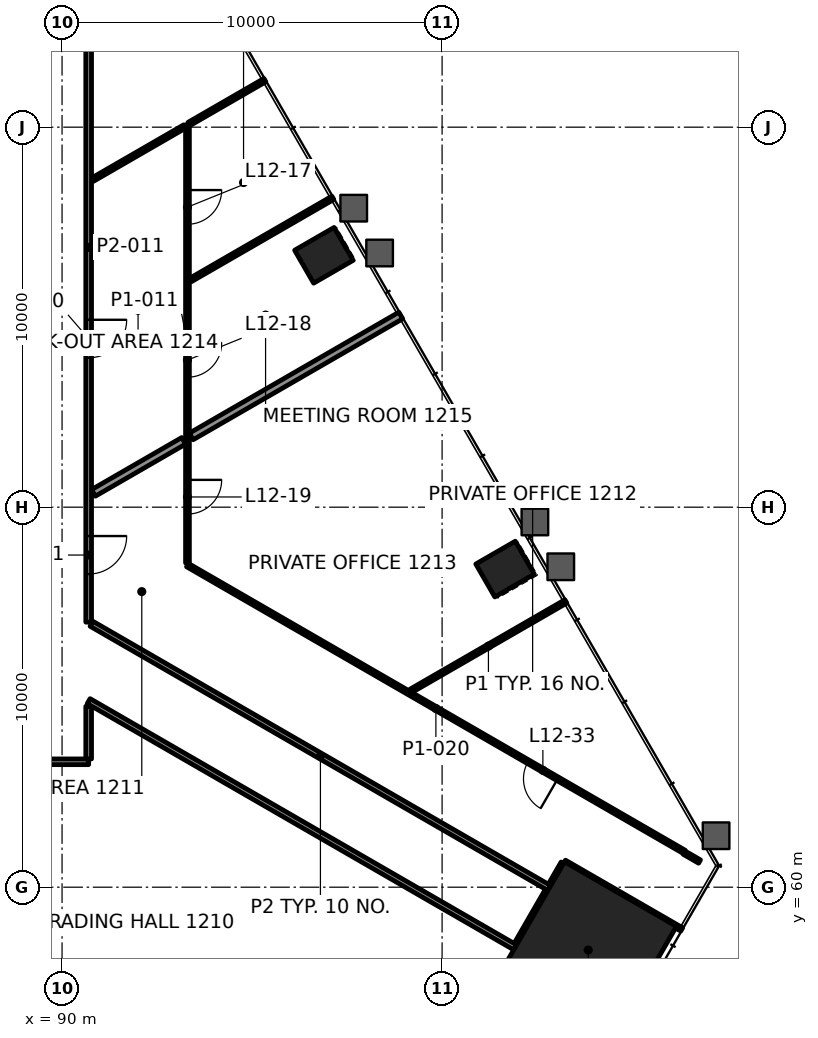
"""IFC4 building model, lengths in metres.
Left out: names, types, materials, properties, quantities, classifications, styles, units other than length and angle.
Written with IfcOpenShell. Run it as: python <this file> out.ifc"""

import sys

from ifc_helpers import new_model, si_unit, direction, frame, frame_2d, origin, origin_2d, place, context, subcontext, project, spatial, rectangle, extrude, element, fill, save


model = new_model("IFC4")
c1 = context("Model", 3, precision=1e-05, world=origin(), true_north=direction((0.0, 1.0)))
c2 = subcontext(c1, "Body", "Model", "MODEL_VIEW")
j1 = project(units=[si_unit("LENGTHUNIT", "METRE"), si_unit("PLANEANGLEUNIT", "RADIAN")], contexts=[c1])
p1 = place(None, origin())
s1 = spatial("IfcSite", under=j1, at=p1, CompositionType="ELEMENT")
p2 = place(p1, origin())
s2 = spatial("IfcBuilding", under=s1, at=p2, CompositionType="ELEMENT")
p3 = place(p2, frame((0.0, 0.0, 56.8)))
s3 = spatial("IfcBuildingStorey", under=s2, at=p3, CompositionType="ELEMENT", Elevation=56.8)
p4 = place(p3, frame((103.844, 58.347, 0.0), z_axis=(0.0, 0.0, 1.0), x_axis=(0.5, 0.866025403784, 0.0)))
e1 = element("IfcColumn", 1, at=p4, inside=s3, PredefinedType="COLUMN", context=c2, shape_type="SweptSolid", body=[
    extrude(rectangle(XDim=3.4, YDim=3.4, at=origin_2d()), origin(), (0.0, 0.0, 1.0), 4.2),
])
for number, where, z_axis, x_axis in (
    (2, (101.657, 68.371, -0.0), (0.0, 0.0, 1.0), (-0.5, 0.866, 0.0)),
    (3, (96.889, 76.628, -0.0), (0.0, 0.0, 1.0), (-0.5, 0.866, 0.0)),
):
    element("IfcColumn", number, at=place(p3, frame(where, z_axis=z_axis, x_axis=x_axis)), inside=s3, PredefinedType="COLUMN", context=c2, shape_type="SweptSolid", body=[
        extrude(rectangle(XDim=1.0, YDim=1.2, at=origin_2d()), origin(), (0.0, 0.0, 1.0), 4.2),
    ])
p5 = place(p3, frame((90.699, 63.3, 0.0), z_axis=(0.0, 0.0, 1.0), x_axis=(-1.0, 0.0, 0.0)))
e4 = element("IfcWall", 4, at=p5, inside=s3, PredefinedType="PARTITIONING", context=c2, shape_type="SweptSolid", body=[
    extrude(rectangle(XDim=31.399, YDim=0.15, at=frame_2d((15.7, 0.0))), origin(), (0.0, 0.0, 1.0), 3.4),
])
p6 = place(p5, frame((4.968, 0.0, 0.0)))
e5 = element("IfcOpeningElement", 5, at=p6, cuts=e4, PredefinedType="OPENING", context=c2, shape_type="SweptSolid", body=[
    extrude(rectangle(XDim=1.2, YDim=2.1, at=frame_2d((0.6, 1.05))), frame((0.0, 0.085, 0.0), z_axis=(0.0, -1.0, 0.0), x_axis=(1.0, 0.0, 0.0)), (0.0, 0.0, 1.0), 0.17),
])
p7 = place(p5, frame((13.908, 0.0, 0.0)))
e6 = element("IfcOpeningElement", 6, at=p7, cuts=e4, PredefinedType="OPENING", context=c2, shape_type="SweptSolid", body=[
    extrude(rectangle(XDim=1.2, YDim=2.1, at=frame_2d((0.6, 1.05))), frame((0.0, 0.085, 0.0), z_axis=(0.0, -1.0, 0.0), x_axis=(1.0, 0.0, 0.0)), (0.0, 0.0, 1.0), 0.17),
])
p8 = place(p5, frame((24.14, 0.0, 0.0)))
e7 = element("IfcOpeningElement", 7, at=p8, cuts=e4, PredefinedType="OPENING", context=c2, shape_type="SweptSolid", body=[
    extrude(rectangle(XDim=1.0, YDim=2.1, at=frame_2d((0.5, 1.05))), frame((0.0, 0.085, 0.0), z_axis=(0.0, -1.0, 0.0), x_axis=(1.0, 0.0, 0.0)), (0.0, 0.0, 1.0), 0.17),
])
p9 = place(p3, frame((99.182, 65.168, 0.0), z_axis=(0.0, 0.0, 1.0), x_axis=(0.866024864377, 0.50000093428, 0.0)))
e8 = element("IfcWall", 8, at=p9, inside=s3, PredefinedType="PARTITIONING", context=c2, shape_type="SweptSolid", body=[
    extrude(rectangle(XDim=4.705, YDim=0.1, at=frame_2d((2.353, 0.0))), origin(), (0.0, 0.0, 1.0), 3.4),
])
p10 = place(p3, frame((90.827, 70.376, 0.0), z_axis=(0.0, 0.0, 1.0), x_axis=(0.866019409031, 0.500010383074, 0.0)))
e9 = element("IfcWall", 9, at=p10, inside=s3, PredefinedType="PARTITIONING", context=c2, shape_type="SweptSolid", body=[
    extrude(rectangle(XDim=2.74, YDim=0.2, at=frame_2d((1.37, 0.0))), origin(), (0.0, 0.0, 1.0), 3.4),
])
p11 = place(p3, frame((93.376, 75.976, 0.0), z_axis=(0.0, 0.0, 1.0), x_axis=(0.866006192811, 0.500033272906, 0.0)))
e10 = element("IfcWall", 10, at=p11, inside=s3, PredefinedType="PARTITIONING", context=c2, shape_type="SweptSolid", body=[
    extrude(rectangle(XDim=4.329, YDim=0.1, at=frame_2d((2.165, 0.0))), origin(), (0.0, 0.0, 1.0), 3.165),
])
p12 = place(p3, frame((90.801, 78.618, 0.0), z_axis=(0.0, 0.0, 1.0), x_axis=(0.866028733576, 0.499994232587, 0.0)))
e11 = element("IfcWall", 11, at=p12, inside=s3, PredefinedType="PARTITIONING", context=c2, shape_type="SweptSolid", body=[
    extrude(rectangle(XDim=2.799, YDim=0.1, at=frame_2d((1.4, 0.0))), origin(), (0.0, 0.0, 1.0), 3.4),
])
p13 = place(p3, frame((101.96, 58.482, 0.0), z_axis=(0.0, 0.0, 1.0), x_axis=(0.500102515474, 0.865966208357, 0.0)))
e12 = element("IfcWall", 12, at=p13, inside=s3, PredefinedType="PARTITIONING", context=c2, shape_type="SweptSolid", body=[
    extrude(rectangle(XDim=1.65, YDim=0.15, at=frame_2d((0.825, 0.0))), origin(), (0.0, 0.0, 1.0), 3.247),
])
p14 = place(p3, frame((93.3, 80.061, 0.0), z_axis=(0.0, 0.0, 1.0), x_axis=(0.0, -1.0, 0.0)))
e13 = element("IfcWall", 13, at=p14, inside=s3, PredefinedType="PARTITIONING", context=c2, shape_type="SweptSolid", body=[
    extrude(rectangle(XDim=11.527, YDim=0.1, at=frame_2d((5.764, 0.0))), origin(), (0.0, 0.0, 1.0), 3.4),
])
p15 = place(p14, frame((1.716, 0.0, 0.0)))
e14 = element("IfcOpeningElement", 14, at=p15, cuts=e13, PredefinedType="OPENING", context=c2, shape_type="SweptSolid", body=[
    extrude(rectangle(XDim=0.9, YDim=2.1, at=frame_2d((0.45, 1.05))), frame((0.0, 0.06, 0.0), z_axis=(0.0, -1.0, 0.0), x_axis=(1.0, 0.0, 0.0)), (0.0, 0.0, 1.0), 0.12),
])
p16 = place(p14, frame((5.741, 0.0, 0.0)))
e15 = element("IfcOpeningElement", 15, at=p16, cuts=e13, PredefinedType="OPENING", context=c2, shape_type="SweptSolid", body=[
    extrude(rectangle(XDim=0.9, YDim=2.1, at=frame_2d((0.45, 1.05))), frame((0.0, 0.06, 0.0), z_axis=(0.0, -1.0, 0.0), x_axis=(1.0, 0.0, 0.0)), (0.0, 0.0, 1.0), 0.12),
])
p17 = place(p14, frame((9.342, 0.0, 0.0)))
e16 = element("IfcOpeningElement", 16, at=p17, cuts=e13, PredefinedType="OPENING", context=c2, shape_type="SweptSolid", body=[
    extrude(rectangle(XDim=0.9, YDim=2.1, at=frame_2d((0.45, 1.05))), frame((0.0, 0.06, 0.0), z_axis=(0.0, -1.0, 0.0), x_axis=(1.0, 0.0, 0.0)), (0.0, 0.0, 1.0), 0.12),
])
p18 = place(p3, frame((90.7, 63.375, 0.0), z_axis=(0.0, 0.0, 1.0), x_axis=(0.0, 1.0, 0.0)))
e17 = element("IfcWall", 17, at=p18, inside=s3, PredefinedType="PARTITIONING", context=c2, shape_type="SweptSolid", body=[
    extrude(rectangle(XDim=1.384, YDim=0.15, at=frame_2d((0.692, 0.0))), origin(), (0.0, 0.0, 1.0), 3.247),
])
p19 = place(p3, frame((90.7, 86.699, 0.0), z_axis=(0.0, 0.0, 1.0), x_axis=(0.0, -1.0, 0.0)))
e18 = element("IfcWall", 18, at=p19, inside=s3, PredefinedType="PARTITIONING", context=c2, shape_type="SweptSolid", body=[
    extrude(rectangle(XDim=19.725, YDim=0.15, at=frame_2d((9.862, 0.0))), origin(), (0.0, 0.0, 1.0), 3.4),
])
p20 = place(p19, frame((11.768, 0.0, 0.0)))
e19 = element("IfcOpeningElement", 19, at=p20, cuts=e18, PredefinedType="OPENING", context=c2, shape_type="SweptSolid", body=[
    extrude(rectangle(XDim=1.0, YDim=2.1, at=frame_2d((0.5, 1.05))), frame((0.0, 0.085, 0.0), z_axis=(0.0, -1.0, 0.0), x_axis=(1.0, 0.0, 0.0)), (0.0, 0.0, 1.0), 0.17),
])
p21 = place(p19, frame((17.459, 0.0, 0.0)))
e20 = element("IfcOpeningElement", 20, at=p21, cuts=e18, PredefinedType="OPENING", context=c2, shape_type="SweptSolid", body=[
    extrude(rectangle(XDim=1.0, YDim=2.1, at=frame_2d((0.5, 1.05))), frame((0.0, 0.085, 0.0), z_axis=(0.0, -1.0, 0.0), x_axis=(1.0, 0.0, 0.0)), (0.0, 0.0, 1.0), 0.17),
])
p22 = place(p3, frame((106.374, 60.928, 0.0), z_axis=(0.0, 0.0, 1.0), x_axis=(-0.866022109353, 0.50000570608, 0.0)))
e21 = element("IfcWall", 21, at=p22, inside=s3, PredefinedType="PARTITIONING", context=c2, shape_type="SweptSolid", body=[
    extrude(rectangle(XDim=15.096, YDim=0.1, at=frame_2d((7.548, 0.0))), origin(), (0.0, 0.0, 1.0), 3.4),
])
p23 = place(p22, frame((3.847, 0.0, 0.0)))
e22 = element("IfcOpeningElement", 22, at=p23, cuts=e21, PredefinedType="OPENING", context=c2, shape_type="SweptSolid", body=[
    extrude(rectangle(XDim=0.9, YDim=2.1, at=frame_2d((0.45, 1.05))), frame((0.0, 0.06, 0.0), z_axis=(0.0, -1.0, 0.0), x_axis=(1.0, 0.0, 0.0)), (0.0, 0.0, 1.0), 0.12),
])
p24 = place(p3, frame((106.774, 60.675, 0.0), z_axis=(0.0, 0.0, 1.0), x_axis=(-0.865979310119, 0.500079828073, 0.0)))
e23 = element("IfcWall", 23, at=p24, inside=s3, PredefinedType="PARTITIONING", context=c2, shape_type="SweptSolid", body=[
    extrude(rectangle(XDim=0.473, YDim=0.1, at=frame_2d((0.237, 0.0))), origin(), (0.0, 0.0, 1.0), 3.4),
])
p25 = place(p3, frame((106.305, 58.888, 0.0), z_axis=(0.0, 0.0, 1.0), x_axis=(-0.866061095881, 0.499938174379, 0.0)))
e24 = element("IfcWall", 24, at=p25, inside=s3, PredefinedType="PARTITIONING", context=c2, shape_type="SweptSolid", body=[
    extrude(rectangle(XDim=3.56, YDim=0.1, at=frame_2d((1.78, 0.0))), origin(), (0.0, 0.0, 1.0), 3.4),
])
p26 = place(p3, frame((102.822, 59.976, 0.0), z_axis=(0.0, 0.0, 1.0), x_axis=(-0.866019280802, 0.500010605167, 0.0)))
e25 = element("IfcWall", 25, at=p26, inside=s3, PredefinedType="PARTITIONING", context=c2, shape_type="SweptSolid", body=[
    extrude(rectangle(XDim=13.91, YDim=0.15, at=frame_2d((6.955, 0.0))), origin(), (0.0, 0.0, 1.0), 3.4),
])
p27 = place(p3, frame((101.922, 58.417, 0.0), z_axis=(0.0, 0.0, 1.0), x_axis=(-0.866024629744, 0.500001340675, 0.0)))
e26 = element("IfcWall", 26, at=p27, inside=s3, PredefinedType="PARTITIONING", context=c2, shape_type="SweptSolid", body=[
    extrude(rectangle(XDim=12.958, YDim=0.15, at=frame_2d((6.479, 0.0))), origin(), (0.0, 0.0, 1.0), 3.247),
])
p28 = place(p3, frame((93.4, 71.862, 0.0), z_axis=(0.0, 0.0, 1.0), x_axis=(0.866018247172, 0.500012395411, 0.0)))
e27 = element("IfcWall", 27, at=p28, inside=s3, PredefinedType="PARTITIONING", context=c2, shape_type="SweptSolid", body=[
    extrude(rectangle(XDim=6.365, YDim=0.2, at=frame_2d((3.183, 0.0))), origin(), (0.0, 0.0, 1.0), 3.165),
])
p29 = place(p3, frame((93.337, 80.083, 0.0), z_axis=(0.0, 0.0, 1.0), x_axis=(0.866028885721, 0.49999396906, 0.0)))
e28 = element("IfcWall", 28, at=p29, inside=s3, PredefinedType="PARTITIONING", context=c2, shape_type="SweptSolid", body=[
    extrude(rectangle(XDim=2.309, YDim=0.1, at=frame_2d((1.155, 0.0))), origin(), (0.0, 0.0, 1.0), 3.165),
])
p30 = place(p3, frame((102.86, 60.041, 0.0), z_axis=(0.0, 0.0, 1.0), x_axis=(0.500036104519, 0.866004557827, 0.0)))
e29 = element("IfcWall", 29, at=p30, inside=s3, PredefinedType="PARTITIONING", context=c2, shape_type="SweptSolid", body=[
    extrude(rectangle(XDim=0.674, YDim=0.15, at=frame_2d((0.337, 0.0))), origin(), (0.0, 0.0, 1.0), 3.4),
])
p31 = place(p15, origin())
e30 = element("IfcDoor", 30, at=p31, inside=s3, OperationType="SINGLE_SWING_RIGHT", PredefinedType="DOOR", context=c2, shape_type="SweptSolid", body=[
    extrude(rectangle(XDim=0.9, YDim=2.1, at=frame_2d((0.45, 1.05))), frame((0.0, 0.025, 0.0), z_axis=(0.0, -1.0, 0.0), x_axis=(1.0, 0.0, 0.0)), (0.0, 0.0, 1.0), 0.05),
])
fill(e14, e30)
p32 = place(p16, origin())
e31 = element("IfcDoor", 31, at=p32, inside=s3, OperationType="SINGLE_SWING_LEFT", PredefinedType="DOOR", context=c2, shape_type="SweptSolid", body=[
    extrude(rectangle(XDim=0.9, YDim=2.1, at=frame_2d((0.45, 1.05))), frame((0.0, 0.025, 0.0), z_axis=(0.0, -1.0, 0.0), x_axis=(1.0, 0.0, 0.0)), (0.0, 0.0, 1.0), 0.05),
])
fill(e15, e31)
p33 = place(p17, origin())
e32 = element("IfcDoor", 32, at=p33, inside=s3, OperationType="SINGLE_SWING_LEFT", PredefinedType="DOOR", context=c2, shape_type="SweptSolid", body=[
    extrude(rectangle(XDim=0.9, YDim=2.1, at=frame_2d((0.45, 1.05))), frame((0.0, 0.025, 0.0), z_axis=(0.0, -1.0, 0.0), x_axis=(1.0, 0.0, 0.0)), (0.0, 0.0, 1.0), 0.05),
])
fill(e16, e32)
p34 = place(p20, origin())
e33 = element("IfcDoor", 33, at=p34, inside=s3, OperationType="SINGLE_SWING_RIGHT", PredefinedType="DOOR", context=c2, shape_type="SweptSolid", body=[
    extrude(rectangle(XDim=1.0, YDim=2.1, at=frame_2d((0.5, 1.05))), frame((0.0, 0.025, 0.0), z_axis=(0.0, -1.0, 0.0), x_axis=(1.0, 0.0, 0.0)), (0.0, 0.0, 1.0), 0.05),
])
fill(e19, e33)
p35 = place(p21, origin())
e34 = element("IfcDoor", 34, at=p35, inside=s3, OperationType="SINGLE_SWING_LEFT", PredefinedType="DOOR", context=c2, shape_type="SweptSolid", body=[
    extrude(rectangle(XDim=1.0, YDim=2.1, at=frame_2d((0.5, 1.05))), frame((0.0, 0.025, 0.0), z_axis=(0.0, -1.0, 0.0), x_axis=(1.0, 0.0, 0.0)), (0.0, 0.0, 1.0), 0.05),
])
fill(e20, e34)
p36 = place(p23, origin())
e35 = element("IfcDoor", 35, at=p36, inside=s3, OperationType="SINGLE_SWING_LEFT", PredefinedType="DOOR", context=c2, shape_type="SweptSolid", body=[
    extrude(rectangle(XDim=0.9, YDim=2.1, at=frame_2d((0.45, 1.05))), frame((0.0, 0.025, 0.0), z_axis=(0.0, -1.0, 0.0), x_axis=(1.0, 0.0, 0.0)), (0.0, 0.0, 1.0), 0.05),
])
fill(e22, e35)
save(model, sys.argv[1])
